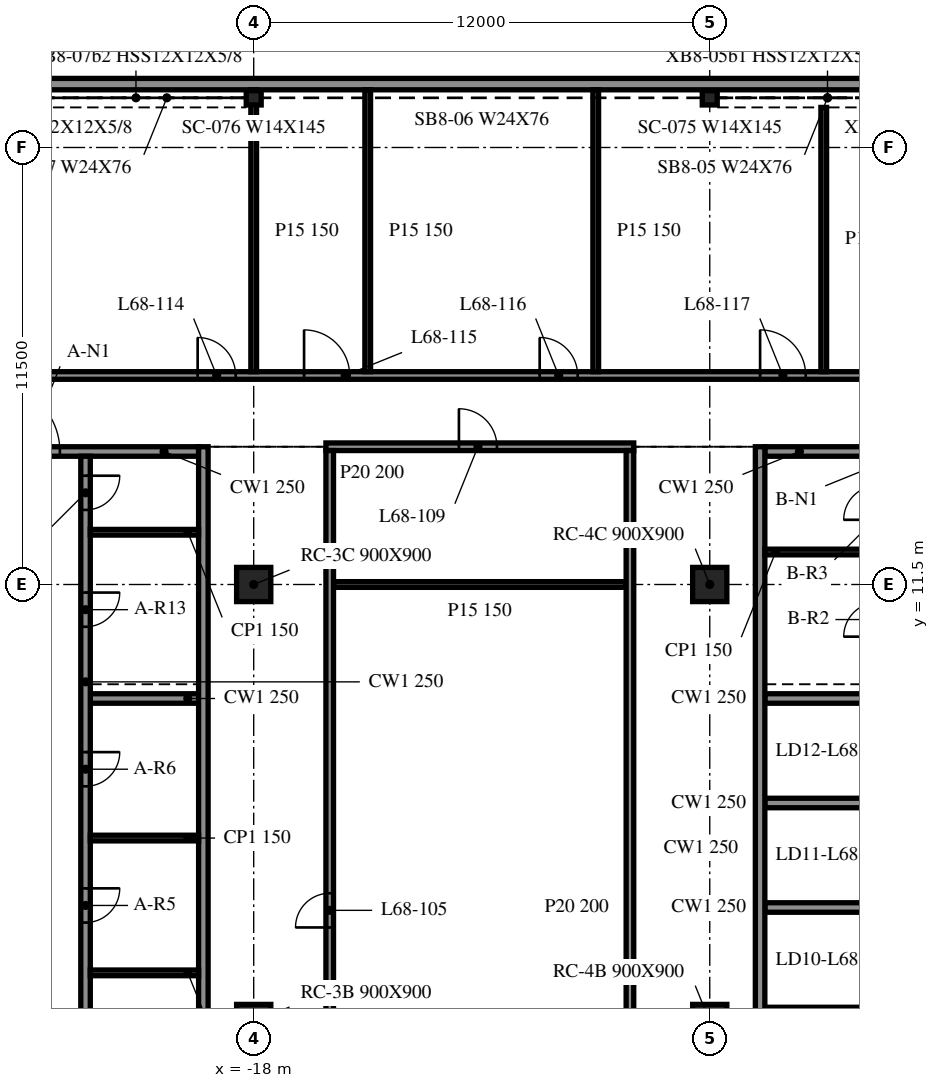
"""IFC4 building model, lengths in metres.
Left out: names, types, materials, properties, quantities, classifications, styles, units other than length and angle.
Written with IfcOpenShell. Run it as: python <this file> out.ifc"""

import sys

from ifc_helpers import new_model, si_unit, direction, frame, frame_2d, origin, origin_2d, place, context, subcontext, project, spatial, rectangle, i_section, extrude, element, fill, save


model = new_model("IFC4")
c1 = context("Model", 3, precision=1e-05, world=origin(), true_north=direction((0.0, 1.0)))
c2 = subcontext(c1, "Body", "Model", "MODEL_VIEW")
j1 = project(units=[si_unit("LENGTHUNIT", "METRE"), si_unit("PLANEANGLEUNIT", "RADIAN")], contexts=[c1])
p1 = place(None, origin())
s1 = spatial("IfcSite", under=j1, at=p1, CompositionType="ELEMENT")
p2 = place(p1, origin())
s2 = spatial("IfcBuilding", under=s1, at=p2, CompositionType="ELEMENT")
p3 = place(p2, frame((0.0, 0.0, 278.5)))
s3 = spatial("IfcBuildingStorey", under=s2, at=p3, CompositionType="ELEMENT", Elevation=278.5)
for number, where, z_axis, x_axis in (
    (1, (-18.0, 0.0, -0.34), (0.0, 0.0, 1.0), (1.0, 0.0, 0.0)),
    (2, (-18.0, 11.5, -0.34), (0.0, 0.0, 1.0), (1.0, 0.0, 0.0)),
    (3, (-6.0, 0.0, -0.34), (0.0, 0.0, 1.0), (1.0, 0.0, 0.0)),
    (4, (-6.0, 11.5, -0.34), (0.0, 0.0, 1.0), (1.0, 0.0, 0.0)),
):
    element("IfcColumn", number, at=place(p3, frame(where, z_axis=z_axis, x_axis=x_axis)), inside=s3, PredefinedType="COLUMN", context=c2, shape_type="SweptSolid", body=[
        extrude(rectangle(XDim=0.9, YDim=0.9, at=origin_2d()), origin(), (0.0, 0.0, 1.0), 3.8),
    ])
for number, where, z_axis, x_axis in (
    (5, (-6.0, 24.307, -0.34), (0.0, 0.0, 1.0), (1.0, 0.0, 0.0)),
    (6, (-18.0, 24.307, -0.34), (0.0, 0.0, 1.0), (1.0, 0.0, 0.0)),
):
    element("IfcColumn", number, at=place(p3, frame(where, z_axis=z_axis, x_axis=x_axis)), inside=s3, PredefinedType="COLUMN", context=c2, shape_type="SweptSolid", body=[
        extrude(i_section(OverallWidth=0.394, OverallDepth=0.376, WebThickness=0.017, FlangeThickness=0.028, at=origin_2d()), origin(), (0.0, 0.0, 1.0), 3.8),
    ])
p4 = place(p3, frame((42.0, 24.668, 0.0), z_axis=(0.0, 0.0, 1.0), x_axis=(-1.0, 0.0, 0.0)))
e7 = element("IfcWall", 7, at=p4, inside=s3, PredefinedType="NOTDEFINED", context=c2, shape_type="SweptSolid", body=[
    extrude(rectangle(XDim=84.0, YDim=0.3, at=frame_2d((42.0, 0.0))), origin(), (0.0, 0.0, 1.0), 2.853),
])
p5 = place(p3, frame((-19.325, -9.125, 0.0), z_axis=(0.0, 0.0, 1.0), x_axis=(0.0, 1.0, 0.0)))
e8 = element("IfcWall", 8, at=p5, inside=s3, PredefinedType="SOLIDWALL", context=c2, shape_type="SweptSolid", body=[
    extrude(rectangle(XDim=24.25, YDim=0.25, at=frame_2d((12.125, 0.0))), origin(), (0.0, 0.0, 1.0), 3.46),
])
p6 = place(p3, frame((-28.55, 15.0, 0.0), z_axis=(0.0, 0.0, 1.0), x_axis=(1.0, 0.0, 0.0)))
e9 = element("IfcWall", 9, at=p6, inside=s3, PredefinedType="SOLIDWALL", context=c2, shape_type="SweptSolid", body=[
    extrude(rectangle(XDim=9.1, YDim=0.25, at=frame_2d((4.55, 0.0))), origin(), (0.0, 0.0, 1.0), 3.46),
])
p7 = place(p6, frame((3.65, 0.0, 0.0)))
e10 = element("IfcOpeningElement", 10, at=p7, cuts=e9, PredefinedType="OPENING", context=c2, shape_type="SweptSolid", body=[
    extrude(rectangle(XDim=1.8, YDim=2.1, at=frame_2d((0.9, 1.05))), frame((0.0, 0.135, 0.0), z_axis=(0.0, -1.0, 0.0), x_axis=(1.0, 0.0, 0.0)), (0.0, 0.0, 1.0), 0.27),
])
p8 = place(p3, frame((-22.425, 14.875, 0.0), z_axis=(0.0, 0.0, 1.0), x_axis=(0.0, -1.0, 0.0)))
e11 = element("IfcWall", 11, at=p8, inside=s3, PredefinedType="SOLIDWALL", context=c2, shape_type="SweptSolid", body=[
    extrude(rectangle(XDim=23.75, YDim=0.25, at=frame_2d((11.875, 0.0))), origin(), (0.0, 0.0, 1.0), 3.46),
])
p9 = place(p8, frame((15.01, 0.0, 0.0)))
e12 = element("IfcOpeningElement", 12, at=p9, cuts=e11, PredefinedType="OPENING", context=c2, shape_type="SweptSolid", body=[
    extrude(rectangle(XDim=0.9, YDim=2.1, at=frame_2d((0.45, 1.05))), frame((0.0, 0.135, 0.0), z_axis=(0.0, -1.0, 0.0), x_axis=(1.0, 0.0, 0.0)), (0.0, 0.0, 1.0), 0.27),
])
p10 = place(p8, frame((11.371, 0.0, 0.0)))
e13 = element("IfcOpeningElement", 13, at=p10, cuts=e11, PredefinedType="OPENING", context=c2, shape_type="SweptSolid", body=[
    extrude(rectangle(XDim=0.9, YDim=2.1, at=frame_2d((0.45, 1.05))), frame((0.0, 0.135, 0.0), z_axis=(0.0, -1.0, 0.0), x_axis=(1.0, 0.0, 0.0)), (0.0, 0.0, 1.0), 0.27),
])
p11 = place(p8, frame((7.786, 0.0, 0.0)))
e14 = element("IfcOpeningElement", 14, at=p11, cuts=e11, PredefinedType="OPENING", context=c2, shape_type="SweptSolid", body=[
    extrude(rectangle(XDim=0.9, YDim=2.1, at=frame_2d((0.45, 1.05))), frame((0.0, 0.135, 0.0), z_axis=(0.0, -1.0, 0.0), x_axis=(1.0, 0.0, 0.0)), (0.0, 0.0, 1.0), 0.27),
])
p12 = place(p8, frame((22.337, 0.0, 0.0)))
e15 = element("IfcOpeningElement", 15, at=p12, cuts=e11, PredefinedType="OPENING", context=c2, shape_type="SweptSolid", body=[
    extrude(rectangle(XDim=0.9, YDim=2.1, at=frame_2d((0.45, 1.05))), frame((0.0, 0.135, 0.0), z_axis=(0.0, -1.0, 0.0), x_axis=(1.0, 0.0, 0.0)), (0.0, 0.0, 1.0), 0.27),
])
p13 = place(p8, frame((20.3, 0.0, 0.0)))
e16 = element("IfcOpeningElement", 16, at=p13, cuts=e11, PredefinedType="OPENING", context=c2, shape_type="SweptSolid", body=[
    extrude(rectangle(XDim=0.9, YDim=2.1, at=frame_2d((0.45, 1.05))), frame((0.0, 0.135, 0.0), z_axis=(0.0, -1.0, 0.0), x_axis=(1.0, 0.0, 0.0)), (0.0, 0.0, 1.0), 0.27),
])
p14 = place(p8, frame((18.262, 0.0, 0.0)))
e17 = element("IfcOpeningElement", 17, at=p14, cuts=e11, PredefinedType="OPENING", context=c2, shape_type="SweptSolid", body=[
    extrude(rectangle(XDim=0.9, YDim=2.1, at=frame_2d((0.45, 1.05))), frame((0.0, 0.135, 0.0), z_axis=(0.0, -1.0, 0.0), x_axis=(1.0, 0.0, 0.0)), (0.0, 0.0, 1.0), 0.27),
])
p15 = place(p8, frame((3.587, 0.0, 0.0)))
e18 = element("IfcOpeningElement", 18, at=p15, cuts=e11, PredefinedType="OPENING", context=c2, shape_type="SweptSolid", body=[
    extrude(rectangle(XDim=0.9, YDim=2.1, at=frame_2d((0.45, 1.05))), frame((0.0, 0.135, 0.0), z_axis=(0.0, -1.0, 0.0), x_axis=(1.0, 0.0, 0.0)), (0.0, 0.0, 1.0), 0.27),
])
p16 = place(p8, frame((0.512, 0.0, 0.0)))
e19 = element("IfcOpeningElement", 19, at=p16, cuts=e11, PredefinedType="OPENING", context=c2, shape_type="SweptSolid", body=[
    extrude(rectangle(XDim=0.9, YDim=2.1, at=frame_2d((0.45, 1.05))), frame((0.0, 0.135, 0.0), z_axis=(0.0, -1.0, 0.0), x_axis=(1.0, 0.0, 0.0)), (0.0, 0.0, 1.0), 0.27),
])
p17 = place(p3, frame((-22.3, 8.5, 0.0), z_axis=(0.0, 0.0, 1.0), x_axis=(1.0, 0.0, 0.0)))
e20 = element("IfcWall", 20, at=p17, inside=s3, PredefinedType="SOLIDWALL", context=c2, shape_type="SweptSolid", body=[
    extrude(rectangle(XDim=2.85, YDim=0.25, at=frame_2d((1.425, 0.0))), origin(), (0.0, 0.0, 1.0), 3.46),
])
for number, where, z_axis, x_axis in (
    (21, (-22.3, 1.28, 0.0), (0.0, 0.0, 1.0), (1.0, 0.0, 0.0)),
    (22, (-22.3, 4.827, 0.0), (0.0, 0.0, 1.0), (1.0, 0.0, 0.0)),
    (23, (-22.3, 12.875, 0.0), (0.0, 0.0, 1.0), (1.0, 0.0, 0.0)),
):
    element("IfcWall", number, at=place(p3, frame(where, z_axis=z_axis, x_axis=x_axis)), inside=s3, PredefinedType="PARTITIONING", context=c2, shape_type="SweptSolid", body=[
        extrude(rectangle(XDim=2.85, YDim=0.15, at=frame_2d((1.425, 0.0))), origin(), (0.0, 0.0, 1.0), 3.46),
    ])
p18 = place(p3, frame((-4.675, 15.125, 0.0), z_axis=(0.0, 0.0, 1.0), x_axis=(0.0, -1.0, 0.0)))
e24 = element("IfcWall", 24, at=p18, inside=s3, PredefinedType="SOLIDWALL", context=c2, shape_type="SweptSolid", body=[
    extrude(rectangle(XDim=24.25, YDim=0.25, at=frame_2d((12.125, 0.0))), origin(), (0.0, 0.0, 1.0), 3.46),
])
p19 = place(p3, frame((-4.55, 15.0, 0.0), z_axis=(0.0, 0.0, 1.0), x_axis=(1.0, 0.0, 0.0)))
e25 = element("IfcWall", 25, at=p19, inside=s3, PredefinedType="SOLIDWALL", context=c2, shape_type="SweptSolid", body=[
    extrude(rectangle(XDim=9.1, YDim=0.25, at=frame_2d((4.55, 0.0))), origin(), (0.0, 0.0, 1.0), 3.46),
])
p20 = place(p19, frame((3.65, 0.0, 0.0)))
e26 = element("IfcOpeningElement", 26, at=p20, cuts=e25, PredefinedType="OPENING", context=c2, shape_type="SweptSolid", body=[
    extrude(rectangle(XDim=1.8, YDim=2.1, at=frame_2d((0.9, 1.05))), frame((0.0, 0.135, 0.0), z_axis=(0.0, -1.0, 0.0), x_axis=(1.0, 0.0, 0.0)), (0.0, 0.0, 1.0), 0.27),
])
for number, where, z_axis, x_axis in (
    (27, (-4.55, 0.25, 0.0), (0.0, 0.0, 1.0), (1.0, 0.0, 0.0)),
    (28, (-4.55, 3.0, 0.0), (0.0, 0.0, 1.0), (1.0, 0.0, 0.0)),
    (29, (-4.55, 5.75, 0.0), (0.0, 0.0, 1.0), (1.0, 0.0, 0.0)),
    (30, (-4.55, 8.5, 0.0), (0.0, 0.0, 1.0), (1.0, 0.0, 0.0)),
):
    element("IfcWall", number, at=place(p3, frame(where, z_axis=z_axis, x_axis=x_axis)), inside=s3, PredefinedType="SOLIDWALL", context=c2, shape_type="SweptSolid", body=[
        extrude(rectangle(XDim=2.85, YDim=0.25, at=frame_2d((1.425, 0.0))), origin(), (0.0, 0.0, 1.0), 3.46),
    ])
p21 = place(p3, frame((-4.55, 12.355, 0.0), z_axis=(0.0, 0.0, 1.0), x_axis=(1.0, 0.0, 0.0)))
e31 = element("IfcWall", 31, at=p21, inside=s3, PredefinedType="PARTITIONING", context=c2, shape_type="SweptSolid", body=[
    extrude(rectangle(XDim=2.85, YDim=0.15, at=frame_2d((1.425, 0.0))), origin(), (0.0, 0.0, 1.0), 3.46),
])
p22 = place(p3, frame((-15.9, 11.5, 0.0), z_axis=(0.0, 0.0, 1.0), x_axis=(1.0, 0.0, 0.0)))
e32 = element("IfcWall", 32, at=p22, inside=s3, PredefinedType="PARTITIONING", context=c2, shape_type="SweptSolid", body=[
    extrude(rectangle(XDim=7.7, YDim=0.15, at=frame_2d((3.85, 0.0))), origin(), (0.0, 0.0, 1.0), 3.46),
])
p23 = place(p3, frame((-16.1, 15.125, 0.0), z_axis=(0.0, 0.0, 1.0), x_axis=(1.0, 0.0, 0.0)))
e33 = element("IfcWall", 33, at=p23, inside=s3, PredefinedType="PARTITIONING", context=c2, shape_type="SweptSolid", body=[
    extrude(rectangle(XDim=8.1, YDim=0.2, at=frame_2d((4.05, 0.0))), origin(), (0.0, 0.0, 1.0), 3.46),
])
p24 = place(p23, frame((3.5, 0.0, 0.0)))
e34 = element("IfcOpeningElement", 34, at=p24, cuts=e33, PredefinedType="OPENING", context=c2, shape_type="SweptSolid", body=[
    extrude(rectangle(XDim=1.0, YDim=2.1, at=frame_2d((0.5, 1.05))), frame((0.0, 0.11, 0.0), z_axis=(0.0, -1.0, 0.0), x_axis=(1.0, 0.0, 0.0)), (0.0, 0.0, 1.0), 0.22),
])
p25 = place(p3, frame((-47.975, 17.0, 0.0), z_axis=(0.0, 0.0, 1.0), x_axis=(1.0, 0.0, 0.0)))
e35 = element("IfcWall", 35, at=p25, inside=s3, PredefinedType="PARTITIONING", context=c2, shape_type="SweptSolid", body=[
    extrude(rectangle(XDim=95.95, YDim=0.2, at=frame_2d((47.975, 0.0))), origin(), (0.0, 0.0, 1.0), 3.46),
])
p26 = place(p25, frame((7.3, 0.0, 0.0)))
e36 = element("IfcOpeningElement", 36, at=p26, cuts=e35, PredefinedType="OPENING", context=c2, shape_type="SweptSolid", body=[
    extrude(rectangle(XDim=1.2, YDim=2.1, at=frame_2d((0.6, 1.05))), frame((0.0, 0.11, 0.0), z_axis=(0.0, -1.0, 0.0), x_axis=(1.0, 0.0, 0.0)), (0.0, 0.0, 1.0), 0.22),
])
p27 = place(p25, frame((13.3, 0.0, 0.0)))
e37 = element("IfcOpeningElement", 37, at=p27, cuts=e35, PredefinedType="OPENING", context=c2, shape_type="SweptSolid", body=[
    extrude(rectangle(XDim=1.2, YDim=2.1, at=frame_2d((0.6, 1.05))), frame((0.0, 0.11, 0.0), z_axis=(0.0, -1.0, 0.0), x_axis=(1.0, 0.0, 0.0)), (0.0, 0.0, 1.0), 0.22),
])
p28 = place(p25, frame((19.3, 0.0, 0.0)))
e38 = element("IfcOpeningElement", 38, at=p28, cuts=e35, PredefinedType="OPENING", context=c2, shape_type="SweptSolid", body=[
    extrude(rectangle(XDim=1.2, YDim=2.1, at=frame_2d((0.6, 1.05))), frame((0.0, 0.11, 0.0), z_axis=(0.0, -1.0, 0.0), x_axis=(1.0, 0.0, 0.0)), (0.0, 0.0, 1.0), 0.22),
])
p29 = place(p25, frame((28.5, 0.0, 0.0)))
e39 = element("IfcOpeningElement", 39, at=p29, cuts=e35, PredefinedType="OPENING", context=c2, shape_type="SweptSolid", body=[
    extrude(rectangle(XDim=1.0, YDim=2.1, at=frame_2d((0.5, 1.05))), frame((0.0, 0.11, 0.0), z_axis=(0.0, -1.0, 0.0), x_axis=(1.0, 0.0, 0.0)), (0.0, 0.0, 1.0), 0.22),
])
p30 = place(p25, frame((31.3, 0.0, 0.0)))
e40 = element("IfcOpeningElement", 40, at=p30, cuts=e35, PredefinedType="OPENING", context=c2, shape_type="SweptSolid", body=[
    extrude(rectangle(XDim=1.2, YDim=2.1, at=frame_2d((0.6, 1.05))), frame((0.0, 0.11, 0.0), z_axis=(0.0, -1.0, 0.0), x_axis=(1.0, 0.0, 0.0)), (0.0, 0.0, 1.0), 0.22),
])
p31 = place(p25, frame((37.5, 0.0, 0.0)))
e41 = element("IfcOpeningElement", 41, at=p31, cuts=e35, PredefinedType="OPENING", context=c2, shape_type="SweptSolid", body=[
    extrude(rectangle(XDim=1.0, YDim=2.1, at=frame_2d((0.5, 1.05))), frame((0.0, 0.11, 0.0), z_axis=(0.0, -1.0, 0.0), x_axis=(1.0, 0.0, 0.0)), (0.0, 0.0, 1.0), 0.22),
])
p32 = place(p25, frame((43.3, 0.0, 0.0)))
e42 = element("IfcOpeningElement", 42, at=p32, cuts=e35, PredefinedType="OPENING", context=c2, shape_type="SweptSolid", body=[
    extrude(rectangle(XDim=1.2, YDim=2.1, at=frame_2d((0.6, 1.05))), frame((0.0, 0.11, 0.0), z_axis=(0.0, -1.0, 0.0), x_axis=(1.0, 0.0, 0.0)), (0.0, 0.0, 1.0), 0.22),
])
p33 = place(p25, frame((47.3, 0.0, 0.0)))
e43 = element("IfcOpeningElement", 43, at=p33, cuts=e35, PredefinedType="OPENING", context=c2, shape_type="SweptSolid", body=[
    extrude(rectangle(XDim=1.2, YDim=2.1, at=frame_2d((0.6, 1.05))), frame((0.0, 0.11, 0.0), z_axis=(0.0, -1.0, 0.0), x_axis=(1.0, 0.0, 0.0)), (0.0, 0.0, 1.0), 0.22),
])
p34 = place(p25, frame((51.1, 0.0, 0.0)))
e44 = element("IfcOpeningElement", 44, at=p34, cuts=e35, PredefinedType="OPENING", context=c2, shape_type="SweptSolid", body=[
    extrude(rectangle(XDim=1.2, YDim=2.1, at=frame_2d((0.6, 1.05))), frame((0.0, 0.11, 0.0), z_axis=(0.0, -1.0, 0.0), x_axis=(1.0, 0.0, 0.0)), (0.0, 0.0, 1.0), 0.22),
])
p35 = place(p25, frame((60.1, 0.0, 0.0)))
e45 = element("IfcOpeningElement", 45, at=p35, cuts=e35, PredefinedType="OPENING", context=c2, shape_type="SweptSolid", body=[
    extrude(rectangle(XDim=1.0, YDim=2.1, at=frame_2d((0.5, 1.05))), frame((0.0, 0.11, 0.0), z_axis=(0.0, -1.0, 0.0), x_axis=(1.0, 0.0, 0.0)), (0.0, 0.0, 1.0), 0.22),
])
p36 = place(p25, frame((63.1, 0.0, 0.0)))
e46 = element("IfcOpeningElement", 46, at=p36, cuts=e35, PredefinedType="OPENING", context=c2, shape_type="SweptSolid", body=[
    extrude(rectangle(XDim=1.2, YDim=2.1, at=frame_2d((0.6, 1.05))), frame((0.0, 0.11, 0.0), z_axis=(0.0, -1.0, 0.0), x_axis=(1.0, 0.0, 0.0)), (0.0, 0.0, 1.0), 0.22),
])
p37 = place(p25, frame((69.1, 0.0, 0.0)))
e47 = element("IfcOpeningElement", 47, at=p37, cuts=e35, PredefinedType="OPENING", context=c2, shape_type="SweptSolid", body=[
    extrude(rectangle(XDim=1.0, YDim=2.1, at=frame_2d((0.5, 1.05))), frame((0.0, 0.11, 0.0), z_axis=(0.0, -1.0, 0.0), x_axis=(1.0, 0.0, 0.0)), (0.0, 0.0, 1.0), 0.22),
])
p38 = place(p25, frame((75.1, 0.0, 0.0)))
e48 = element("IfcOpeningElement", 48, at=p38, cuts=e35, PredefinedType="OPENING", context=c2, shape_type="SweptSolid", body=[
    extrude(rectangle(XDim=1.2, YDim=2.1, at=frame_2d((0.6, 1.05))), frame((0.0, 0.11, 0.0), z_axis=(0.0, -1.0, 0.0), x_axis=(1.0, 0.0, 0.0)), (0.0, 0.0, 1.0), 0.22),
])
p39 = place(p25, frame((81.1, 0.0, 0.0)))
e49 = element("IfcOpeningElement", 49, at=p39, cuts=e35, PredefinedType="OPENING", context=c2, shape_type="SweptSolid", body=[
    extrude(rectangle(XDim=1.2, YDim=2.1, at=frame_2d((0.6, 1.05))), frame((0.0, 0.11, 0.0), z_axis=(0.0, -1.0, 0.0), x_axis=(1.0, 0.0, 0.0)), (0.0, 0.0, 1.0), 0.22),
])
p40 = place(p25, frame((90.1, 0.0, 0.0)))
e50 = element("IfcOpeningElement", 50, at=p40, cuts=e35, PredefinedType="OPENING", context=c2, shape_type="SweptSolid", body=[
    extrude(rectangle(XDim=1.2, YDim=2.1, at=frame_2d((0.6, 1.05))), frame((0.0, 0.11, 0.0), z_axis=(0.0, -1.0, 0.0), x_axis=(1.0, 0.0, 0.0)), (0.0, 0.0, 1.0), 0.22),
])
p41 = place(p3, frame((-18.0, 17.1, 0.0), z_axis=(0.0, 0.0, 1.0), x_axis=(0.0, 1.0, 0.0)))
e51 = element("IfcWall", 51, at=p41, inside=s3, PredefinedType="PARTITIONING", context=c2, shape_type="SweptSolid", body=[
    extrude(rectangle(XDim=7.418, YDim=0.15, at=frame_2d((3.709, 0.0))), origin(), (0.0, 0.0, 1.0), 3.46),
])
p42 = place(p3, frame((-16.0, -9.025, 0.0), z_axis=(0.0, 0.0, 1.0), x_axis=(0.0, 1.0, 0.0)))
e52 = element("IfcWall", 52, at=p42, inside=s3, PredefinedType="PARTITIONING", context=c2, shape_type="SweptSolid", body=[
    extrude(rectangle(XDim=24.05, YDim=0.2, at=frame_2d((12.025, 0.0))), origin(), (0.0, 0.0, 1.0), 3.46),
])
p43 = place(p42, frame((11.5, 0.0, 0.0)))
e53 = element("IfcOpeningElement", 53, at=p43, cuts=e52, PredefinedType="OPENING", context=c2, shape_type="SweptSolid", body=[
    extrude(rectangle(XDim=0.9, YDim=2.1, at=frame_2d((0.45, 1.05))), frame((0.0, 0.11, 0.0), z_axis=(0.0, -1.0, 0.0), x_axis=(1.0, 0.0, 0.0)), (0.0, 0.0, 1.0), 0.22),
])
for number, where, z_axis, x_axis in (
    (54, (-15.0, 17.1, 0.0), (0.0, 0.0, 1.0), (0.0, 1.0, 0.0)),
    (55, (-9.0, 17.1, 0.0), (0.0, 0.0, 1.0), (0.0, 1.0, 0.0)),
):
    element("IfcWall", number, at=place(p3, frame(where, z_axis=z_axis, x_axis=x_axis)), inside=s3, PredefinedType="PARTITIONING", context=c2, shape_type="SweptSolid", body=[
        extrude(rectangle(XDim=7.418, YDim=0.15, at=frame_2d((3.709, 0.0))), origin(), (0.0, 0.0, 1.0), 3.46),
    ])
p44 = place(p3, frame((-8.1, -9.025, 0.0), z_axis=(0.0, 0.0, 1.0), x_axis=(0.0, 1.0, 0.0)))
e56 = element("IfcWall", 56, at=p44, inside=s3, PredefinedType="PARTITIONING", context=c2, shape_type="SweptSolid", body=[
    extrude(rectangle(XDim=24.05, YDim=0.2, at=frame_2d((12.025, 0.0))), origin(), (0.0, 0.0, 1.0), 3.46),
])
p45 = place(p3, frame((-3.0, 17.1, 0.0), z_axis=(0.0, 0.0, 1.0), x_axis=(0.0, 1.0, 0.0)))
e57 = element("IfcWall", 57, at=p45, inside=s3, PredefinedType="PARTITIONING", context=c2, shape_type="SweptSolid", body=[
    extrude(rectangle(XDim=6.955, YDim=0.15, at=frame_2d((3.477, 0.0))), origin(), (0.0, 0.0, 1.0), 3.46),
])
p46 = place(p7, origin())
e58 = element("IfcDoor", 58, at=p46, inside=s3, OperationType="DOUBLE_DOOR_SINGLE_SWING", PredefinedType="DOOR", context=c2, shape_type="SweptSolid", body=[
    extrude(rectangle(XDim=1.8, YDim=2.1, at=frame_2d((0.9, 1.05))), frame((0.0, 0.025, 0.0), z_axis=(0.0, -1.0, 0.0), x_axis=(1.0, 0.0, 0.0)), (0.0, 0.0, 1.0), 0.05),
])
fill(e10, e58)
p47 = place(p10, origin())
e59 = element("IfcDoor", 59, at=p47, inside=s3, OperationType="SINGLE_SWING_LEFT", PredefinedType="DOOR", context=c2, shape_type="SweptSolid", body=[
    extrude(rectangle(XDim=0.9, YDim=2.1, at=frame_2d((0.45, 1.05))), frame((0.0, 0.025, 0.0), z_axis=(0.0, -1.0, 0.0), x_axis=(1.0, 0.0, 0.0)), (0.0, 0.0, 1.0), 0.05),
])
fill(e13, e59)
p48 = place(p11, origin())
e60 = element("IfcDoor", 60, at=p48, inside=s3, OperationType="SINGLE_SWING_RIGHT", PredefinedType="DOOR", context=c2, shape_type="SweptSolid", body=[
    extrude(rectangle(XDim=0.9, YDim=2.1, at=frame_2d((0.45, 1.05))), frame((0.0, 0.025, 0.0), z_axis=(0.0, -1.0, 0.0), x_axis=(1.0, 0.0, 0.0)), (0.0, 0.0, 1.0), 0.05),
])
fill(e14, e60)
p49 = place(p15, origin())
e61 = element("IfcDoor", 61, at=p49, inside=s3, OperationType="SINGLE_SWING_LEFT", PredefinedType="DOOR", context=c2, shape_type="SweptSolid", body=[
    extrude(rectangle(XDim=0.9, YDim=2.1, at=frame_2d((0.45, 1.05))), frame((0.0, 0.025, 0.0), z_axis=(0.0, -1.0, 0.0), x_axis=(1.0, 0.0, 0.0)), (0.0, 0.0, 1.0), 0.05),
])
fill(e18, e61)
p50 = place(p16, origin())
e62 = element("IfcDoor", 62, at=p50, inside=s3, OperationType="SINGLE_SWING_RIGHT", PredefinedType="DOOR", context=c2, shape_type="SweptSolid", body=[
    extrude(rectangle(XDim=0.9, YDim=2.1, at=frame_2d((0.45, 1.05))), frame((0.0, 0.025, 0.0), z_axis=(0.0, -1.0, 0.0), x_axis=(1.0, 0.0, 0.0)), (0.0, 0.0, 1.0), 0.05),
])
fill(e19, e62)
p51 = place(p43, origin())
e63 = element("IfcDoor", 63, at=p51, inside=s3, OperationType="SINGLE_SWING_RIGHT", PredefinedType="DOOR", context=c2, shape_type="SweptSolid", body=[
    extrude(rectangle(XDim=0.9, YDim=2.1, at=frame_2d((0.45, 1.05))), frame((0.0, 0.025, 0.0), z_axis=(0.0, -1.0, 0.0), x_axis=(1.0, 0.0, 0.0)), (0.0, 0.0, 1.0), 0.05),
])
fill(e53, e63)
p52 = place(p24, origin())
e64 = element("IfcDoor", 64, at=p52, inside=s3, OperationType="SINGLE_SWING_RIGHT", PredefinedType="DOOR", context=c2, shape_type="SweptSolid", body=[
    extrude(rectangle(XDim=1.0, YDim=2.1, at=frame_2d((0.5, 1.05))), frame((0.0, 0.025, 0.0), z_axis=(0.0, -1.0, 0.0), x_axis=(1.0, 0.0, 0.0)), (0.0, 0.0, 1.0), 0.05),
])
fill(e34, e64)
p53 = place(p29, origin())
e65 = element("IfcDoor", 65, at=p53, inside=s3, OperationType="SINGLE_SWING_LEFT", PredefinedType="DOOR", context=c2, shape_type="SweptSolid", body=[
    extrude(rectangle(XDim=1.0, YDim=2.1, at=frame_2d((0.5, 1.05))), frame((0.0, 0.025, 0.0), z_axis=(0.0, -1.0, 0.0), x_axis=(1.0, 0.0, 0.0)), (0.0, 0.0, 1.0), 0.05),
])
fill(e39, e65)
p54 = place(p30, origin())
e66 = element("IfcDoor", 66, at=p54, inside=s3, OperationType="SINGLE_SWING_LEFT", PredefinedType="DOOR", context=c2, shape_type="SweptSolid", body=[
    extrude(rectangle(XDim=1.2, YDim=2.1, at=frame_2d((0.6, 1.05))), frame((0.0, 0.025, 0.0), z_axis=(0.0, -1.0, 0.0), x_axis=(1.0, 0.0, 0.0)), (0.0, 0.0, 1.0), 0.05),
])
fill(e40, e66)
p55 = place(p31, origin())
e67 = element("IfcDoor", 67, at=p55, inside=s3, OperationType="SINGLE_SWING_LEFT", PredefinedType="DOOR", context=c2, shape_type="SweptSolid", body=[
    extrude(rectangle(XDim=1.0, YDim=2.1, at=frame_2d((0.5, 1.05))), frame((0.0, 0.025, 0.0), z_axis=(0.0, -1.0, 0.0), x_axis=(1.0, 0.0, 0.0)), (0.0, 0.0, 1.0), 0.05),
])
fill(e41, e67)
p56 = place(p32, origin())
e68 = element("IfcDoor", 68, at=p56, inside=s3, OperationType="SINGLE_SWING_LEFT", PredefinedType="DOOR", context=c2, shape_type="SweptSolid", body=[
    extrude(rectangle(XDim=1.2, YDim=2.1, at=frame_2d((0.6, 1.05))), frame((0.0, 0.025, 0.0), z_axis=(0.0, -1.0, 0.0), x_axis=(1.0, 0.0, 0.0)), (0.0, 0.0, 1.0), 0.05),
])
fill(e42, e68)
save(model, sys.argv[1])
